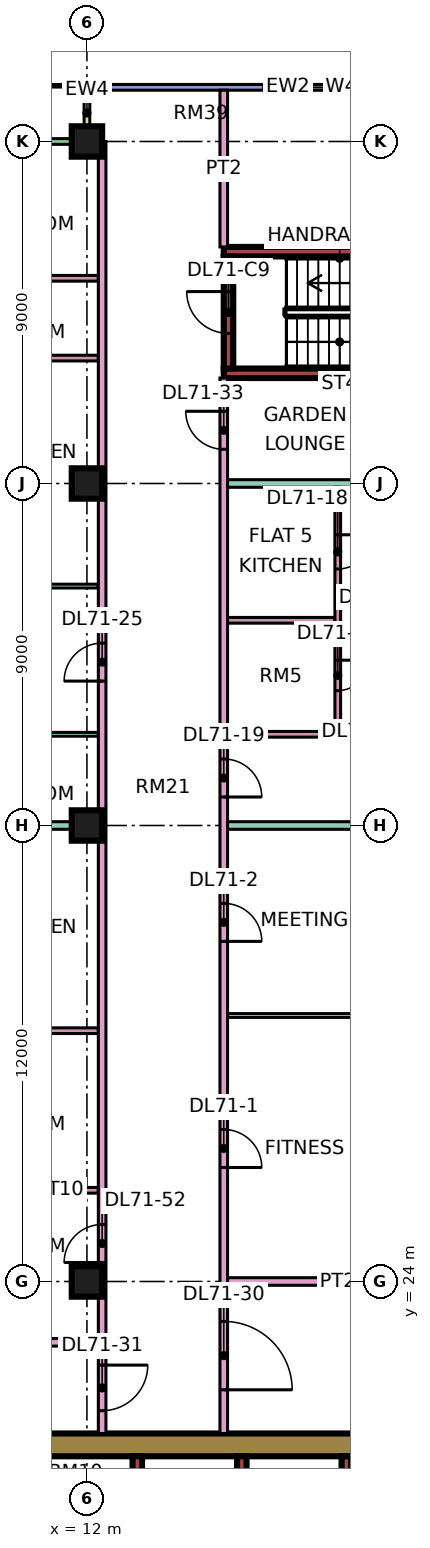
"""IFC4 building model, lengths in metres.
Left out: names, types, materials, properties, quantities, classifications, styles, units other than length and angle.
Written with IfcOpenShell. Run it as: python <this file> out.ifc"""

import sys

from ifc_helpers import new_model, si_unit, direction, frame, frame_2d, origin, origin_2d, place, context, subcontext, project, spatial, rectangle, extrude, element, fill, save


model = new_model("IFC4")
c1 = context("Model", 3, precision=1e-05, world=origin(), true_north=direction((0.0, 1.0)))
c2 = subcontext(c1, "Body", "Model", "MODEL_VIEW")
j1 = project(units=[si_unit("LENGTHUNIT", "METRE"), si_unit("PLANEANGLEUNIT", "RADIAN")], contexts=[c1])
p1 = place(None, origin())
s1 = spatial("IfcSite", under=j1, at=p1, CompositionType="ELEMENT")
p2 = place(p1, origin())
s2 = spatial("IfcBuilding", under=s1, at=p2, CompositionType="ELEMENT")
p3 = place(p2, frame((0.0, 0.0, 303.4)))
s3 = spatial("IfcBuildingStorey", under=s2, at=p3, CompositionType="ELEMENT", Elevation=303.4)
for number, where, z_axis, x_axis in (
    (1, (12.0, 24.0, 0.0), (0.0, 0.0, 1.0), (1.0, 0.0, 0.0)),
    (2, (12.0, 36.0, 0.0), (0.0, 0.0, 1.0), (1.0, 0.0, 0.0)),
    (3, (12.0, 45.0, 0.0), (0.0, 0.0, 1.0), (1.0, 0.0, 0.0)),
    (4, (12.0, 54.0, 0.0), (0.0, 0.0, 1.0), (1.0, 0.0, 0.0)),
):
    element("IfcColumn", number, at=place(p3, frame(where, z_axis=z_axis, x_axis=x_axis)), inside=s3, PredefinedType="COLUMN", context=c2, shape_type="SweptSolid", body=[
        extrude(rectangle(XDim=0.8, YDim=0.8, at=origin_2d()), origin(), (0.0, 0.0, 1.0), 3.75),
    ])
p4 = place(p3, frame((9.0, 19.7, 0.0), z_axis=(0.0, 0.0, 1.0), x_axis=(1.0, 0.0, 0.0)))
e5 = element("IfcWall", 5, at=p4, inside=s3, PredefinedType="SHEAR", context=c2, shape_type="SweptSolid", body=[
    extrude(rectangle(XDim=25.0, YDim=0.6, at=frame_2d((12.5, 0.0))), origin(), (0.0, 0.0, 1.0), 3.75),
])
p5 = place(p4, frame((19.1, 0.0, 0.0)))
e6 = element("IfcOpeningElement", 6, at=p5, cuts=e5, PredefinedType="OPENING", context=c2, shape_type="SweptSolid", body=[
    extrude(rectangle(XDim=1.8, YDim=2.4, at=frame_2d((0.9, 1.2))), frame((0.0, 0.31, 0.0), z_axis=(0.0, -1.0, 0.0), x_axis=(1.0, 0.0, 0.0)), (0.0, 0.0, 1.0), 0.62),
])
p6 = place(p3, frame((13.325, 7.6, 0.0), z_axis=(0.0, 0.0, 1.0), x_axis=(0.0, 1.0, 0.0)))
e7 = element("IfcWall", 7, at=p6, inside=s3, PredefinedType="SHEAR", context=c2, shape_type="SweptSolid", body=[
    extrude(rectangle(XDim=11.8, YDim=0.25, at=frame_2d((5.9, 0.0))), origin(), (0.0, 0.0, 1.0), 3.75),
])
for number, where, z_axis, x_axis in (
    (8, (16.075, 15.8, 0.0), (0.0, 0.0, 1.0), (0.0, 1.0, 0.0)),
    (9, (18.825, 15.8, 0.0), (0.0, 0.0, 1.0), (0.0, 1.0, 0.0)),
):
    element("IfcWall", number, at=place(p3, frame(where, z_axis=z_axis, x_axis=x_axis)), inside=s3, PredefinedType="SHEAR", context=c2, shape_type="SweptSolid", body=[
        extrude(rectangle(XDim=3.6, YDim=0.25, at=frame_2d((1.8, 0.0))), origin(), (0.0, 0.0, 1.0), 3.75),
    ])
for number, where, z_axis, x_axis in (
    (10, (15.6, 47.9, 0.0), (0.0, 0.0, 1.0), (1.0, 0.0, 0.0)),
    (11, (15.6, 51.1, 0.0), (0.0, 0.0, 1.0), (1.0, 0.0, 0.0)),
):
    element("IfcWall", number, at=place(p3, frame(where, z_axis=z_axis, x_axis=x_axis)), inside=s3, PredefinedType="SHEAR", context=c2, shape_type="SweptSolid", body=[
        extrude(rectangle(XDim=7.0, YDim=0.25, at=frame_2d((3.5, 0.0))), origin(), (0.0, 0.0, 1.0), 3.75),
    ])
p7 = place(p3, frame((15.725, 48.025, 0.0), z_axis=(0.0, 0.0, 1.0), x_axis=(0.0, 1.0, 0.0)))
e12 = element("IfcWall", 12, at=p7, inside=s3, PredefinedType="SHEAR", context=c2, shape_type="SweptSolid", body=[
    extrude(rectangle(XDim=2.95, YDim=0.25, at=frame_2d((1.475, 0.0))), origin(), (0.0, 0.0, 1.0), 3.75),
])
p8 = place(p7, frame((0.925, 0.0, 0.0)))
e13 = element("IfcOpeningElement", 13, at=p8, cuts=e12, PredefinedType="OPENING", context=c2, shape_type="SweptSolid", body=[
    extrude(rectangle(XDim=1.1, YDim=2.2, at=frame_2d((0.55, 1.1))), frame((0.0, 0.135, 0.0), z_axis=(0.0, -1.0, 0.0), x_axis=(1.0, 0.0, 0.0)), (0.0, 0.0, 1.0), 0.27),
])
p9 = place(p3, frame((22.5, 55.425, 0.0), z_axis=(0.0, 0.0, 1.0), x_axis=(-1.0, 0.0, 0.0)))
e14 = element("IfcWall", 14, at=p9, inside=s3, PredefinedType="SOLIDWALL", context=c2, shape_type="SweptSolid", body=[
    extrude(rectangle(XDim=10.425, YDim=0.15, at=frame_2d((5.212, 0.0))), origin(), (0.0, 0.0, 1.0), 3.35),
])
p10 = place(p9, frame((1.05, 0.0, 0.45)))
e15 = element("IfcOpeningElement", 15, at=p10, cuts=e14, PredefinedType="OPENING", context=c2, shape_type="SweptSolid", body=[
    extrude(rectangle(XDim=4.8, YDim=2.4, at=frame_2d((2.4, 1.2))), frame((0.0, 0.085, 0.0), z_axis=(0.0, -1.0, 0.0), x_axis=(1.0, 0.0, 0.0)), (0.0, 0.0, 1.0), 0.17),
])
p11 = place(p3, frame((11.925, 54.0, 0.0), z_axis=(0.0, 0.0, 1.0), x_axis=(-1.0, 0.0, 0.0)))
e16 = element("IfcWall", 16, at=p11, inside=s3, PredefinedType="SOLIDWALL", context=c2, shape_type="SweptSolid", body=[
    extrude(rectangle(XDim=10.35, YDim=0.15, at=frame_2d((5.175, 0.0))), origin(), (0.0, 0.0, 1.0), 3.35),
])
p12 = place(p11, frame((6.738, 0.0, 0.0)))
e17 = element("IfcOpeningElement", 17, at=p12, cuts=e16, PredefinedType="OPENING", context=c2, shape_type="SweptSolid", body=[
    extrude(rectangle(XDim=1.8, YDim=2.4, at=frame_2d((0.9, 1.2))), frame((0.0, 0.085, 0.0), z_axis=(0.0, -1.0, 0.0), x_axis=(1.0, 0.0, 0.0)), (0.0, 0.0, 1.0), 0.17),
])
p13 = place(p3, frame((12.0, 55.5, 0.0), z_axis=(0.0, 0.0, 1.0), x_axis=(0.0, -1.0, 0.0)))
e18 = element("IfcWall", 18, at=p13, inside=s3, PredefinedType="SOLIDWALL", context=c2, shape_type="SweptSolid", body=[
    extrude(rectangle(XDim=1.5, YDim=0.15, at=frame_2d((0.75, 0.0))), origin(), (0.0, 0.0, 1.0), 3.35),
])
p14 = place(p3, frame((-1.35, 22.4, 0.0), z_axis=(0.0, 0.0, 1.0), x_axis=(1.0, 0.0, 0.0)))
e19 = element("IfcWall", 19, at=p14, inside=s3, PredefinedType="PARTITIONING", context=c2, shape_type="SweptSolid", body=[
    extrude(rectangle(XDim=13.65, YDim=0.2, at=frame_2d((6.825, 0.0))), origin(), (0.0, 0.0, 1.0), 3.35),
])
p15 = place(p3, frame((0.0, 36.0, 0.0), z_axis=(0.0, 0.0, 1.0), x_axis=(1.0, 0.0, 0.0)))
e20 = element("IfcWall", 20, at=p15, inside=s3, PredefinedType="PARTITIONING", context=c2, shape_type="SweptSolid", body=[
    extrude(rectangle(XDim=12.3, YDim=0.2, at=frame_2d((6.15, 0.0))), origin(), (0.0, 0.0, 1.0), 3.35),
])
p16 = place(p3, frame((7.075, 26.4, 0.0), z_axis=(0.0, 0.0, 1.0), x_axis=(1.0, 0.0, 0.0)))
e21 = element("IfcWall", 21, at=p16, inside=s3, PredefinedType="PARTITIONING", context=c2, shape_type="SweptSolid", body=[
    extrude(rectangle(XDim=5.225, YDim=0.15, at=frame_2d((2.613, 0.0))), origin(), (0.0, 0.0, 1.0), 3.35),
])
p17 = place(p16, frame((2.275, 0.0, 0.0)))
e22 = element("IfcOpeningElement", 22, at=p17, cuts=e21, PredefinedType="OPENING", context=c2, shape_type="SweptSolid", body=[
    extrude(rectangle(XDim=0.8, YDim=2.1, at=frame_2d((0.4, 1.05))), frame((0.0, 0.085, 0.0), z_axis=(0.0, -1.0, 0.0), x_axis=(1.0, 0.0, 0.0)), (0.0, 0.0, 1.0), 0.17),
])
p18 = place(p3, frame((7.075, 30.6, 0.0), z_axis=(0.0, 0.0, 1.0), x_axis=(1.0, 0.0, 0.0)))
e23 = element("IfcWall", 23, at=p18, inside=s3, PredefinedType="PARTITIONING", context=c2, shape_type="SweptSolid", body=[
    extrude(rectangle(XDim=5.225, YDim=0.15, at=frame_2d((2.613, 0.0))), origin(), (0.0, 0.0, 1.0), 3.35),
])
for number, where, z_axis, x_axis in (
    (24, (7.075, 38.4, 0.0), (0.0, 0.0, 1.0), (1.0, 0.0, 0.0)),
    (25, (7.075, 42.3, 0.0), (0.0, 0.0, 1.0), (1.0, 0.0, 0.0)),
):
    element("IfcWall", number, at=place(p3, frame(where, z_axis=z_axis, x_axis=x_axis)), inside=s3, PredefinedType="PARTITIONING", context=c2, shape_type="SweptSolid", body=[
        extrude(rectangle(XDim=5.225, YDim=0.1, at=frame_2d((2.613, 0.0))), origin(), (0.0, 0.0, 1.0), 3.35),
    ])
for number, where, z_axis, x_axis in (
    (26, (7.075, 48.3, 0.0), (0.0, 0.0, 1.0), (1.0, 0.0, 0.0)),
    (27, (7.075, 50.4, 0.0), (0.0, 0.0, 1.0), (1.0, 0.0, 0.0)),
):
    element("IfcWall", number, at=place(p3, frame(where, z_axis=z_axis, x_axis=x_axis)), inside=s3, PredefinedType="PARTITIONING", context=c2, shape_type="SweptSolid", body=[
        extrude(rectangle(XDim=5.225, YDim=0.15, at=frame_2d((2.613, 0.0))), origin(), (0.0, 0.0, 1.0), 3.35),
    ])
p19 = place(p3, frame((12.4, 20.0, 0.0), z_axis=(0.0, 0.0, 1.0), x_axis=(0.0, 1.0, 0.0)))
e28 = element("IfcWall", 28, at=p19, inside=s3, PredefinedType="PARTITIONING", context=c2, shape_type="SweptSolid", body=[
    extrude(rectangle(XDim=34.0, YDim=0.2, at=frame_2d((17.0, 0.0))), origin(), (0.0, 0.0, 1.0), 3.35),
])
p20 = place(p19, frame((19.8, 0.0, 0.0)))
e29 = element("IfcOpeningElement", 29, at=p20, cuts=e28, PredefinedType="OPENING", context=c2, shape_type="SweptSolid", body=[
    extrude(rectangle(XDim=1.0, YDim=2.1, at=frame_2d((0.5, 1.05))), frame((0.0, 0.11, 0.0), z_axis=(0.0, -1.0, 0.0), x_axis=(1.0, 0.0, 0.0)), (0.0, 0.0, 1.0), 0.22),
])
p21 = place(p19, frame((0.6, 0.0, 0.0)))
e30 = element("IfcOpeningElement", 30, at=p21, cuts=e28, PredefinedType="OPENING", context=c2, shape_type="SweptSolid", body=[
    extrude(rectangle(XDim=1.2, YDim=2.1, at=frame_2d((0.6, 1.05))), frame((0.0, 0.11, 0.0), z_axis=(0.0, -1.0, 0.0), x_axis=(1.0, 0.0, 0.0)), (0.0, 0.0, 1.0), 0.22),
])
p22 = place(p19, frame((4.5, 0.0, 0.0)))
e31 = element("IfcOpeningElement", 31, at=p22, cuts=e28, PredefinedType="OPENING", context=c2, shape_type="SweptSolid", body=[
    extrude(rectangle(XDim=1.0, YDim=2.1, at=frame_2d((0.5, 1.05))), frame((0.0, 0.11, 0.0), z_axis=(0.0, -1.0, 0.0), x_axis=(1.0, 0.0, 0.0)), (0.0, 0.0, 1.0), 0.22),
])
p23 = place(p3, frame((15.6, 20.0, 0.0), z_axis=(0.0, 0.0, 1.0), x_axis=(0.0, 1.0, 0.0)))
e32 = element("IfcWall", 32, at=p23, inside=s3, PredefinedType="PARTITIONING", context=c2, shape_type="SweptSolid", body=[
    extrude(rectangle(XDim=27.775, YDim=0.2, at=frame_2d((13.887, 0.0))), origin(), (0.0, 0.0, 1.0), 3.35),
])
p24 = place(p23, frame((7.0, 0.0, 0.0)))
e33 = element("IfcOpeningElement", 33, at=p24, cuts=e32, PredefinedType="OPENING", context=c2, shape_type="SweptSolid", body=[
    extrude(rectangle(XDim=1.0, YDim=2.1, at=frame_2d((0.5, 1.05))), frame((0.0, 0.11, 0.0), z_axis=(0.0, -1.0, 0.0), x_axis=(1.0, 0.0, 0.0)), (0.0, 0.0, 1.0), 0.22),
])
p25 = place(p23, frame((12.95, 0.0, 0.0)))
e34 = element("IfcOpeningElement", 34, at=p25, cuts=e32, PredefinedType="OPENING", context=c2, shape_type="SweptSolid", body=[
    extrude(rectangle(XDim=1.0, YDim=2.1, at=frame_2d((0.5, 1.05))), frame((0.0, 0.11, 0.0), z_axis=(0.0, -1.0, 0.0), x_axis=(1.0, 0.0, 0.0)), (0.0, 0.0, 1.0), 0.22),
])
p26 = place(p23, frame((16.75, 0.0, 0.0)))
e35 = element("IfcOpeningElement", 35, at=p26, cuts=e32, PredefinedType="OPENING", context=c2, shape_type="SweptSolid", body=[
    extrude(rectangle(XDim=1.0, YDim=2.1, at=frame_2d((0.5, 1.05))), frame((0.0, 0.11, 0.0), z_axis=(0.0, -1.0, 0.0), x_axis=(1.0, 0.0, 0.0)), (0.0, 0.0, 1.0), 0.22),
])
p27 = place(p23, frame((1.15, 0.0, 0.0)))
e36 = element("IfcOpeningElement", 36, at=p27, cuts=e32, PredefinedType="OPENING", context=c2, shape_type="SweptSolid", body=[
    extrude(rectangle(XDim=1.8, YDim=2.1, at=frame_2d((0.9, 1.05))), frame((0.0, 0.11, 0.0), z_axis=(0.0, -1.0, 0.0), x_axis=(1.0, 0.0, 0.0)), (0.0, 0.0, 1.0), 0.22),
])
p28 = place(p23, frame((25.9, 0.0, 0.0)))
e37 = element("IfcOpeningElement", 37, at=p28, cuts=e32, PredefinedType="OPENING", context=c2, shape_type="SweptSolid", body=[
    extrude(rectangle(XDim=1.0, YDim=2.1, at=frame_2d((0.5, 1.05))), frame((0.0, 0.11, 0.0), z_axis=(0.0, -1.0, 0.0), x_axis=(1.0, 0.0, 0.0)), (0.0, 0.0, 1.0), 0.22),
])
p29 = place(p3, frame((15.6, 51.225, 0.0), z_axis=(0.0, 0.0, 1.0), x_axis=(0.0, 1.0, 0.0)))
e38 = element("IfcWall", 38, at=p29, inside=s3, PredefinedType="PARTITIONING", context=c2, shape_type="SweptSolid", body=[
    extrude(rectangle(XDim=4.125, YDim=0.2, at=frame_2d((2.062, 0.0))), origin(), (0.0, 0.0, 1.0), 3.35),
])
p30 = place(p3, frame((15.7, 24.0, 0.0), z_axis=(0.0, 0.0, 1.0), x_axis=(1.0, 0.0, 0.0)))
e39 = element("IfcWall", 39, at=p30, inside=s3, PredefinedType="PARTITIONING", context=c2, shape_type="SweptSolid", body=[
    extrude(rectangle(XDim=5.8, YDim=0.2, at=frame_2d((2.9, 0.0))), origin(), (0.0, 0.0, 1.0), 3.35),
])
p31 = place(p3, frame((15.7, 31.0, 0.0), z_axis=(0.0, 0.0, 1.0), x_axis=(1.0, 0.0, 0.0)))
e40 = element("IfcWall", 40, at=p31, inside=s3, PredefinedType="PARTITIONING", context=c2, shape_type="SweptSolid", body=[
    extrude(rectangle(XDim=5.8, YDim=0.1, at=frame_2d((2.9, 0.0))), origin(), (0.0, 0.0, 1.0), 3.35),
])
p32 = place(p3, frame((15.7, 36.0, 0.0), z_axis=(0.0, 0.0, 1.0), x_axis=(1.0, 0.0, 0.0)))
e41 = element("IfcWall", 41, at=p32, inside=s3, PredefinedType="PARTITIONING", context=c2, shape_type="SweptSolid", body=[
    extrude(rectangle(XDim=8.3, YDim=0.2, at=frame_2d((4.15, 0.0))), origin(), (0.0, 0.0, 1.0), 3.35),
])
for number, where, z_axis, x_axis in (
    (42, (15.7, 38.4, 0.0), (0.0, 0.0, 1.0), (1.0, 0.0, 0.0)),
    (43, (15.7, 41.4, 0.0), (0.0, 0.0, 1.0), (1.0, 0.0, 0.0)),
):
    element("IfcWall", number, at=place(p3, frame(where, z_axis=z_axis, x_axis=x_axis)), inside=s3, PredefinedType="PARTITIONING", context=c2, shape_type="SweptSolid", body=[
        extrude(rectangle(XDim=2.825, YDim=0.15, at=frame_2d((1.413, 0.0))), origin(), (0.0, 0.0, 1.0), 3.35),
    ])
p33 = place(p3, frame((15.7, 45.0, 0.0), z_axis=(0.0, 0.0, 1.0), x_axis=(1.0, 0.0, 0.0)))
e44 = element("IfcWall", 44, at=p33, inside=s3, PredefinedType="PARTITIONING", context=c2, shape_type="SweptSolid", body=[
    extrude(rectangle(XDim=8.3, YDim=0.2, at=frame_2d((4.15, 0.0))), origin(), (0.0, 0.0, 1.0), 3.35),
])
p34 = place(p3, frame((18.6, 38.325, 0.0), z_axis=(0.0, 0.0, 1.0), x_axis=(0.0, 1.0, 0.0)))
e45 = element("IfcWall", 45, at=p34, inside=s3, PredefinedType="PARTITIONING", context=c2, shape_type="SweptSolid", body=[
    extrude(rectangle(XDim=6.575, YDim=0.15, at=frame_2d((3.288, 0.0))), origin(), (0.0, 0.0, 1.0), 3.35),
])
p35 = place(p34, frame((1.225, 0.0, 0.0)))
e46 = element("IfcOpeningElement", 46, at=p35, cuts=e45, PredefinedType="OPENING", context=c2, shape_type="SweptSolid", body=[
    extrude(rectangle(XDim=0.8, YDim=2.1, at=frame_2d((0.4, 1.05))), frame((0.0, 0.085, 0.0), z_axis=(0.0, -1.0, 0.0), x_axis=(1.0, 0.0, 0.0)), (0.0, 0.0, 1.0), 0.17),
])
p36 = place(p34, frame((4.425, 0.0, 0.0)))
e47 = element("IfcOpeningElement", 47, at=p36, cuts=e45, PredefinedType="OPENING", context=c2, shape_type="SweptSolid", body=[
    extrude(rectangle(XDim=0.9, YDim=2.1, at=frame_2d((0.45, 1.05))), frame((0.0, 0.085, 0.0), z_axis=(0.0, -1.0, 0.0), x_axis=(1.0, 0.0, 0.0)), (0.0, 0.0, 1.0), 0.17),
])
p37 = place(p10, origin())
e48 = element("IfcWindow", 48, at=p37, inside=s3, PartitioningType="SINGLE_PANEL", PredefinedType="WINDOW", context=c2, shape_type="SweptSolid", body=[
    extrude(rectangle(XDim=4.8, YDim=2.4, at=frame_2d((2.4, 1.2))), frame((0.0, 0.03, 0.0), z_axis=(0.0, -1.0, 0.0), x_axis=(1.0, 0.0, 0.0)), (0.0, 0.0, 1.0), 0.06),
])
fill(e15, e48)
p38 = place(p8, frame((1.1, 0.0, 0.0), z_axis=(0.0, 0.0, 1.0), x_axis=(-1.0, 0.0, 0.0)))
e49 = element("IfcDoor", 49, at=p38, inside=s3, OperationType="SINGLE_SWING_RIGHT", PredefinedType="DOOR", context=c2, shape_type="SweptSolid", body=[
    extrude(rectangle(XDim=1.1, YDim=2.2, at=frame_2d((0.55, 1.1))), frame((0.0, 0.025, 0.0), z_axis=(0.0, -1.0, 0.0), x_axis=(1.0, 0.0, 0.0)), (0.0, 0.0, 1.0), 0.05),
])
fill(e13, e49)
p39 = place(p24, frame((1.0, 0.0, 0.0), z_axis=(0.0, 0.0, 1.0), x_axis=(-1.0, 0.0, 0.0)))
e50 = element("IfcDoor", 50, at=p39, inside=s3, OperationType="SINGLE_SWING_LEFT", PredefinedType="DOOR", context=c2, shape_type="SweptSolid", body=[
    extrude(rectangle(XDim=1.0, YDim=2.1, at=frame_2d((0.5, 1.05))), frame((0.0, 0.025, 0.0), z_axis=(0.0, -1.0, 0.0), x_axis=(1.0, 0.0, 0.0)), (0.0, 0.0, 1.0), 0.05),
])
fill(e33, e50)
p40 = place(p25, frame((1.0, 0.0, 0.0), z_axis=(0.0, 0.0, 1.0), x_axis=(-1.0, 0.0, 0.0)))
e51 = element("IfcDoor", 51, at=p40, inside=s3, OperationType="SINGLE_SWING_LEFT", PredefinedType="DOOR", context=c2, shape_type="SweptSolid", body=[
    extrude(rectangle(XDim=1.0, YDim=2.1, at=frame_2d((0.5, 1.05))), frame((0.0, 0.025, 0.0), z_axis=(0.0, -1.0, 0.0), x_axis=(1.0, 0.0, 0.0)), (0.0, 0.0, 1.0), 0.05),
])
fill(e34, e51)
p41 = place(p35, origin())
e52 = element("IfcDoor", 52, at=p41, inside=s3, OperationType="SINGLE_SWING_RIGHT", PredefinedType="DOOR", context=c2, shape_type="SweptSolid", body=[
    extrude(rectangle(XDim=0.8, YDim=2.1, at=frame_2d((0.4, 1.05))), frame((0.0, 0.025, 0.0), z_axis=(0.0, -1.0, 0.0), x_axis=(1.0, 0.0, 0.0)), (0.0, 0.0, 1.0), 0.05),
])
fill(e46, e52)
p42 = place(p36, origin())
e53 = element("IfcDoor", 53, at=p42, inside=s3, OperationType="SINGLE_SWING_RIGHT", PredefinedType="DOOR", context=c2, shape_type="SweptSolid", body=[
    extrude(rectangle(XDim=0.9, YDim=2.1, at=frame_2d((0.45, 1.05))), frame((0.0, 0.025, 0.0), z_axis=(0.0, -1.0, 0.0), x_axis=(1.0, 0.0, 0.0)), (0.0, 0.0, 1.0), 0.05),
])
fill(e47, e53)
p43 = place(p26, frame((1.0, 0.0, 0.0), z_axis=(0.0, 0.0, 1.0), x_axis=(-1.0, 0.0, 0.0)))
e54 = element("IfcDoor", 54, at=p43, inside=s3, OperationType="SINGLE_SWING_LEFT", PredefinedType="DOOR", context=c2, shape_type="SweptSolid", body=[
    extrude(rectangle(XDim=1.0, YDim=2.1, at=frame_2d((0.5, 1.05))), frame((0.0, 0.025, 0.0), z_axis=(0.0, -1.0, 0.0), x_axis=(1.0, 0.0, 0.0)), (0.0, 0.0, 1.0), 0.05),
])
fill(e35, e54)
p44 = place(p20, origin())
e55 = element("IfcDoor", 55, at=p44, inside=s3, OperationType="SINGLE_SWING_LEFT", PredefinedType="DOOR", context=c2, shape_type="SweptSolid", body=[
    extrude(rectangle(XDim=1.0, YDim=2.1, at=frame_2d((0.5, 1.05))), frame((0.0, 0.025, 0.0), z_axis=(0.0, -1.0, 0.0), x_axis=(1.0, 0.0, 0.0)), (0.0, 0.0, 1.0), 0.05),
])
fill(e29, e55)
p45 = place(p27, frame((1.8, 0.0, 0.0), z_axis=(0.0, 0.0, 1.0), x_axis=(-1.0, 0.0, 0.0)))
e56 = element("IfcDoor", 56, at=p45, inside=s3, OperationType="DOUBLE_DOOR_SINGLE_SWING", PredefinedType="DOOR", context=c2, shape_type="SweptSolid", body=[
    extrude(rectangle(XDim=1.8, YDim=2.1, at=frame_2d((0.9, 1.05))), frame((0.0, 0.025, 0.0), z_axis=(0.0, -1.0, 0.0), x_axis=(1.0, 0.0, 0.0)), (0.0, 0.0, 1.0), 0.05),
])
fill(e36, e56)
p46 = place(p21, origin())
e57 = element("IfcDoor", 57, at=p46, inside=s3, OperationType="SINGLE_SWING_RIGHT", PredefinedType="DOOR", context=c2, shape_type="SweptSolid", body=[
    extrude(rectangle(XDim=1.2, YDim=2.1, at=frame_2d((0.6, 1.05))), frame((0.0, 0.025, 0.0), z_axis=(0.0, -1.0, 0.0), x_axis=(1.0, 0.0, 0.0)), (0.0, 0.0, 1.0), 0.05),
])
fill(e30, e57)
p47 = place(p28, frame((1.0, 0.0, 0.0), z_axis=(0.0, 0.0, 1.0), x_axis=(-1.0, 0.0, 0.0)))
e58 = element("IfcDoor", 58, at=p47, inside=s3, OperationType="SINGLE_SWING_RIGHT", PredefinedType="DOOR", context=c2, shape_type="SweptSolid", body=[
    extrude(rectangle(XDim=1.0, YDim=2.1, at=frame_2d((0.5, 1.05))), frame((0.0, 0.025, 0.0), z_axis=(0.0, -1.0, 0.0), x_axis=(1.0, 0.0, 0.0)), (0.0, 0.0, 1.0), 0.05),
])
fill(e37, e58)
p48 = place(p22, origin())
e59 = element("IfcDoor", 59, at=p48, inside=s3, OperationType="SINGLE_SWING_LEFT", PredefinedType="DOOR", context=c2, shape_type="SweptSolid", body=[
    extrude(rectangle(XDim=1.0, YDim=2.1, at=frame_2d((0.5, 1.05))), frame((0.0, 0.025, 0.0), z_axis=(0.0, -1.0, 0.0), x_axis=(1.0, 0.0, 0.0)), (0.0, 0.0, 1.0), 0.05),
])
fill(e31, e59)
save(model, sys.argv[1])
